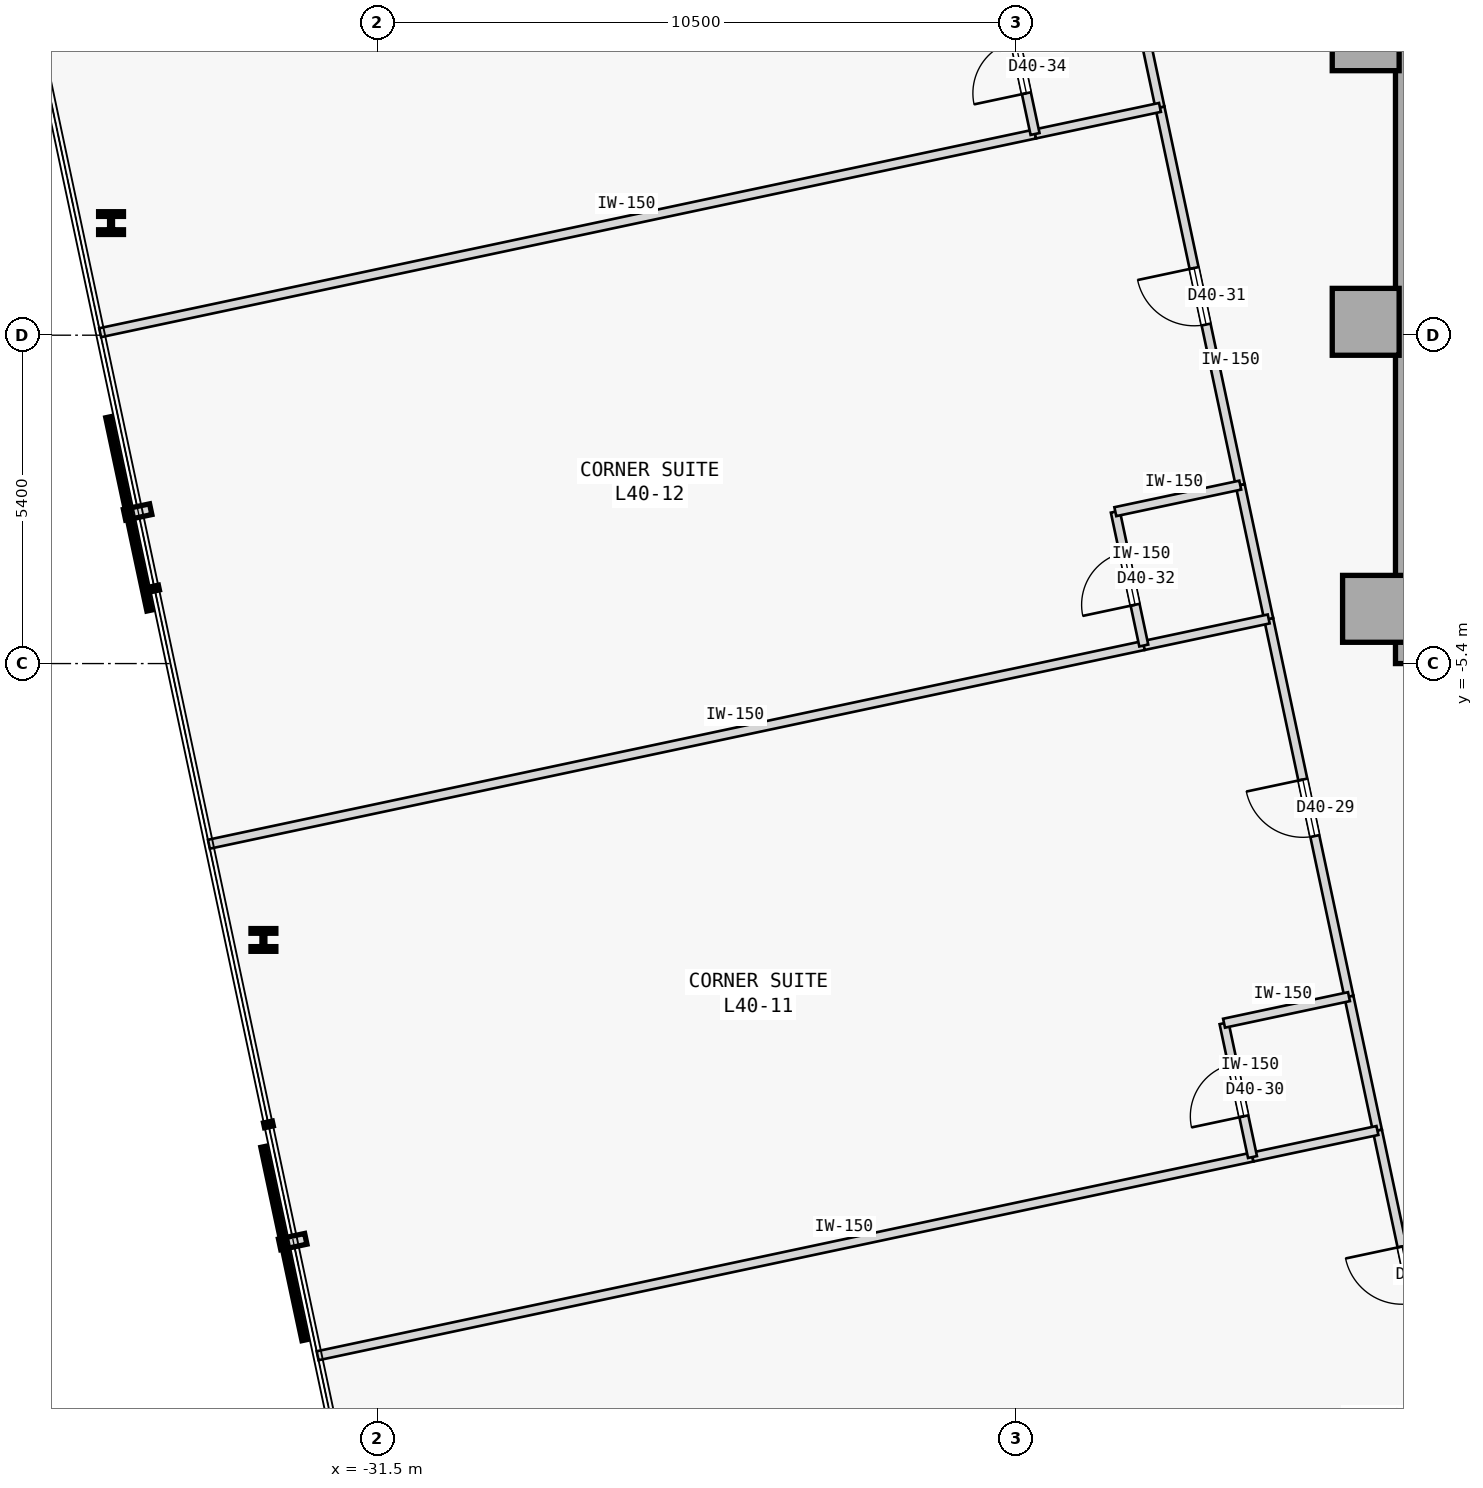
"""IFC4 building model, lengths in metres.
Left out: names, types, materials, properties, quantities, classifications, styles, units other than length and angle.
Written with IfcOpenShell. Run it as: python <this file> out.ifc"""

import sys

from ifc_helpers import new_model, si_unit, direction, frame, frame_2d, origin, origin_2d, place, context, subcontext, project, spatial, rectangle, i_section, extrude, element, fill, save


model = new_model("IFC4")
c1 = context("Model", 3, precision=1e-05, world=origin(), true_north=direction((0.0, 1.0)))
c2 = subcontext(c1, "Body", "Model", "MODEL_VIEW")
j1 = project(units=[si_unit("LENGTHUNIT", "METRE"), si_unit("PLANEANGLEUNIT", "RADIAN")], contexts=[c1])
p1 = place(None, origin())
s1 = spatial("IfcSite", under=j1, at=p1, CompositionType="ELEMENT")
p2 = place(p1, origin())
s2 = spatial("IfcBuilding", under=s1, at=p2, CompositionType="ELEMENT")
p3 = place(p2, frame((0.0, 0.0, 158.2)))
s3 = spatial("IfcBuildingStorey", under=s2, at=p3, CompositionType="ELEMENT", Elevation=158.2)
for number, where, z_axis, x_axis in (
    (1, (-15.25, 4.9, 0.0), (0.0, 0.0, 1.0), (1.0, 0.0, 0.0)),
    (2, (-15.25, 0.22, 0.0), (0.0, 0.0, 1.0), (1.0, 0.0, 0.0)),
    (3, (-15.08, -4.5, 0.0), (0.0, 0.0, 1.0), (1.0, 0.0, 0.0)),
):
    element("IfcColumn", number, at=place(p3, frame(where, z_axis=z_axis, x_axis=x_axis)), inside=s3, PredefinedType="COLUMN", context=c2, shape_type="SweptSolid", body=[
        extrude(rectangle(XDim=1.1, YDim=1.1, at=origin_2d()), origin(), (0.0, 0.0, 1.0), 3.4),
    ])
p4 = place(p3, frame((-14.56, -5.4, 0.0), z_axis=(0.0, 0.0, 1.0), x_axis=(0.0, 1.0, 0.0)))
e4 = element("IfcWall", 4, at=p4, inside=s3, PredefinedType="SHEAR", context=c2, shape_type="SweptSolid", body=[
    extrude(rectangle(XDim=10.8, YDim=0.4, at=frame_2d((5.4, 0.0))), origin(), (0.0, 0.0, 1.0), 3.175),
])
for number, where, z_axis, x_axis in (
    (5, (-35.883, 1.844, 0.0), (0.0, 0.0, 1.0), (1.0, 0.0, 0.0)),
    (6, (-33.377, -9.945, 0.0), (0.0, 0.0, 1.0), (1.0, 0.0, 0.0)),
):
    element("IfcColumn", number, at=place(p3, frame(where, z_axis=z_axis, x_axis=x_axis)), inside=s3, PredefinedType="COLUMN", context=c2, shape_type="SweptSolid", body=[
        extrude(i_section(OverallWidth=0.409, OverallDepth=0.374, WebThickness=0.048, FlangeThickness=0.077, FilletRadius=0.015, at=origin_2d()), origin(), (0.0, 0.0, 1.0), 3.4),
    ])
p5 = place(p3, frame((-14.049, -17.823, 0.0), z_axis=(0.0, 0.0, 1.0), x_axis=(-0.2079027059, 0.978149510494, 0.0)))
e7 = element("IfcWall", 7, at=p5, inside=s3, PredefinedType="PARTITIONING", context=c2, shape_type="SweptSolid", body=[
    extrude(rectangle(XDim=4.85, YDim=0.15, at=frame_2d((2.425, 0.0))), origin(), (0.0, 0.0, 1.0), 3.175),
])
p6 = place(p5, frame((1.95, 0.0, 0.0)))
e8 = element("IfcOpeningElement", 8, at=p6, cuts=e7, PredefinedType="OPENING", context=c2, shape_type="SweptSolid", body=[
    extrude(rectangle(XDim=0.95, YDim=2.15, at=frame_2d((0.475, 1.075))), frame((0.0, 0.085, 0.0), z_axis=(0.0, -1.0, 0.0), x_axis=(1.0, 0.0, 0.0)), (0.0, 0.0, 1.0), 0.17),
])
p7 = place(p3, frame((-15.525, -10.878, 0.0), z_axis=(0.0, 0.0, 1.0), x_axis=(-0.207887725283, 0.978152694459, 0.0)))
e9 = element("IfcWall", 9, at=p7, inside=s3, PredefinedType="PARTITIONING", context=c2, shape_type="SweptSolid", body=[
    extrude(rectangle(XDim=6.35, YDim=0.15, at=frame_2d((3.175, 0.0))), origin(), (0.0, 0.0, 1.0), 3.175),
])
p8 = place(p7, frame((2.7, 0.0, 0.0)))
e10 = element("IfcOpeningElement", 10, at=p8, cuts=e9, PredefinedType="OPENING", context=c2, shape_type="SweptSolid", body=[
    extrude(rectangle(XDim=0.95, YDim=2.15, at=frame_2d((0.475, 1.075))), frame((0.0, 0.085, 0.0), z_axis=(0.0, -1.0, 0.0), x_axis=(1.0, 0.0, 0.0)), (0.0, 0.0, 1.0), 0.17),
])
p9 = place(p3, frame((-15.057, -13.079, 0.0), z_axis=(0.0, 0.0, 1.0), x_axis=(-0.207995007687, 0.978129887478, 0.0)))
e11 = element("IfcWall", 11, at=p9, inside=s3, PredefinedType="PARTITIONING", context=c2, shape_type="SweptSolid", body=[
    extrude(rectangle(XDim=2.25, YDim=0.15, at=frame_2d((1.125, 0.0))), origin(), (0.0, 0.0, 1.0), 3.175),
])
p10 = place(p3, frame((-17.313, -2.466, 0.0), z_axis=(0.0, 0.0, 1.0), x_axis=(-0.207916691923, 0.978146537703, 0.0)))
e12 = element("IfcWall", 12, at=p10, inside=s3, PredefinedType="PARTITIONING", context=c2, shape_type="SweptSolid", body=[
    extrude(rectangle(XDim=6.35, YDim=0.15, at=frame_2d((3.175, 0.0))), origin(), (0.0, 0.0, 1.0), 3.175),
])
p11 = place(p10, frame((2.7, 0.0, 0.0)))
e13 = element("IfcOpeningElement", 13, at=p11, cuts=e12, PredefinedType="OPENING", context=c2, shape_type="SweptSolid", body=[
    extrude(rectangle(XDim=0.95, YDim=2.15, at=frame_2d((0.475, 1.075))), frame((0.0, 0.085, 0.0), z_axis=(0.0, -1.0, 0.0), x_axis=(1.0, 0.0, 0.0)), (0.0, 0.0, 1.0), 0.17),
])
for number, where, z_axis, x_axis in (
    (14, (-16.845, -4.667, 0.0), (0.0, 0.0, 1.0), (-0.208, 0.978, 0.0)),
    (15, (-18.633, 3.746, 0.0), (0.0, 0.0, 1.0), (-0.208, 0.978, 0.0)),
):
    element("IfcWall", number, at=place(p3, frame(where, z_axis=z_axis, x_axis=x_axis)), inside=s3, PredefinedType="PARTITIONING", context=c2, shape_type="SweptSolid", body=[
        extrude(rectangle(XDim=2.25, YDim=0.15, at=frame_2d((1.125, 0.0))), origin(), (0.0, 0.0, 1.0), 3.175),
    ])
p12 = place(p3, frame((-32.486, -16.783, 0.0), z_axis=(0.0, 0.0, 1.0), x_axis=(0.978146137903, 0.207918572776, 0.0)))
e16 = element("IfcWall", 16, at=p12, inside=s3, PredefinedType="PARTITIONING", context=c2, shape_type="SweptSolid", body=[
    extrude(rectangle(XDim=15.718, YDim=0.15, at=frame_2d((7.859, 0.0))), origin(), (0.0, 0.0, 1.0), 3.175),
])
p13 = place(p3, frame((-17.111, -13.515, 0.0), z_axis=(0.0, 0.0, 1.0), x_axis=(0.97815826, 0.207861536591, 0.0)))
e17 = element("IfcWall", 17, at=p13, inside=s3, PredefinedType="PARTITIONING", context=c2, shape_type="SweptSolid", body=[
    extrude(rectangle(XDim=2.1, YDim=0.15, at=frame_2d((1.05, 0.0))), origin(), (0.0, 0.0, 1.0), 3.175),
])
p14 = place(p3, frame((-17.111, -13.515, 0.0), z_axis=(0.0, 0.0, 1.0), x_axis=(-0.207913264065, 0.978147266328, 0.0)))
e18 = element("IfcWall", 18, at=p14, inside=s3, PredefinedType="PARTITIONING", context=c2, shape_type="SweptSolid", body=[
    extrude(rectangle(XDim=2.25, YDim=0.15, at=frame_2d((1.125, 0.0))), origin(), (0.0, 0.0, 1.0), 3.175),
])
p15 = place(p14, frame((0.685, 0.0, 0.0)))
e19 = element("IfcOpeningElement", 19, at=p15, cuts=e18, PredefinedType="OPENING", context=c2, shape_type="SweptSolid", body=[
    extrude(rectangle(XDim=0.88, YDim=2.15, at=frame_2d((0.44, 1.075))), frame((0.0, 0.085, 0.0), z_axis=(0.0, -1.0, 0.0), x_axis=(1.0, 0.0, 0.0)), (0.0, 0.0, 1.0), 0.17),
])
p16 = place(p3, frame((-17.579, -11.314, 0.0), z_axis=(0.0, 0.0, 1.0), x_axis=(0.978129588365, 0.207996414309, 0.0)))
e20 = element("IfcWall", 20, at=p16, inside=s3, PredefinedType="PARTITIONING", context=c2, shape_type="SweptSolid", body=[
    extrude(rectangle(XDim=2.1, YDim=0.15, at=frame_2d((1.05, 0.0))), origin(), (0.0, 0.0, 1.0), 3.175),
])
p17 = place(p3, frame((-34.274, -8.371, 0.0), z_axis=(0.0, 0.0, 1.0), x_axis=(0.978146137903, 0.207918572776, 0.0)))
e21 = element("IfcWall", 21, at=p17, inside=s3, PredefinedType="PARTITIONING", context=c2, shape_type="SweptSolid", body=[
    extrude(rectangle(XDim=15.718, YDim=0.15, at=frame_2d((7.859, 0.0))), origin(), (0.0, 0.0, 1.0), 3.175),
])
p18 = place(p3, frame((-18.899, -5.103, 0.0), z_axis=(0.0, 0.0, 1.0), x_axis=(0.97815826, 0.207861536591, 0.0)))
e22 = element("IfcWall", 22, at=p18, inside=s3, PredefinedType="PARTITIONING", context=c2, shape_type="SweptSolid", body=[
    extrude(rectangle(XDim=2.1, YDim=0.15, at=frame_2d((1.05, 0.0))), origin(), (0.0, 0.0, 1.0), 3.175),
])
p19 = place(p3, frame((-18.899, -5.103, 0.0), z_axis=(0.0, 0.0, 1.0), x_axis=(-0.207913264065, 0.978147266328, 0.0)))
e23 = element("IfcWall", 23, at=p19, inside=s3, PredefinedType="PARTITIONING", context=c2, shape_type="SweptSolid", body=[
    extrude(rectangle(XDim=2.25, YDim=0.15, at=frame_2d((1.125, 0.0))), origin(), (0.0, 0.0, 1.0), 3.175),
])
p20 = place(p19, frame((0.685, 0.0, 0.0)))
e24 = element("IfcOpeningElement", 24, at=p20, cuts=e23, PredefinedType="OPENING", context=c2, shape_type="SweptSolid", body=[
    extrude(rectangle(XDim=0.88, YDim=2.15, at=frame_2d((0.44, 1.075))), frame((0.0, 0.085, 0.0), z_axis=(0.0, -1.0, 0.0), x_axis=(1.0, 0.0, 0.0)), (0.0, 0.0, 1.0), 0.17),
])
p21 = place(p3, frame((-19.367, -2.902, 0.0), z_axis=(0.0, 0.0, 1.0), x_axis=(0.97815826, 0.207861536591, 0.0)))
e25 = element("IfcWall", 25, at=p21, inside=s3, PredefinedType="PARTITIONING", context=c2, shape_type="SweptSolid", body=[
    extrude(rectangle(XDim=2.1, YDim=0.15, at=frame_2d((1.05, 0.0))), origin(), (0.0, 0.0, 1.0), 3.175),
])
p22 = place(p3, frame((-36.062, 0.041, 0.0), z_axis=(0.0, 0.0, 1.0), x_axis=(0.978149296727, 0.207903711638, 0.0)))
e26 = element("IfcWall", 26, at=p22, inside=s3, PredefinedType="PARTITIONING", context=c2, shape_type="SweptSolid", body=[
    extrude(rectangle(XDim=15.718, YDim=0.15, at=frame_2d((7.859, 0.0))), origin(), (0.0, 0.0, 1.0), 3.175),
])
p23 = place(p3, frame((-20.688, 3.309, 0.0), z_axis=(0.0, 0.0, 1.0), x_axis=(0.978134617382, 0.207972763311, 0.0)))
e27 = element("IfcWall", 27, at=p23, inside=s3, PredefinedType="PARTITIONING", context=c2, shape_type="SweptSolid", body=[
    extrude(rectangle(XDim=2.1, YDim=0.15, at=frame_2d((1.05, 0.0))), origin(), (0.0, 0.0, 1.0), 3.175),
])
p24 = place(p3, frame((-20.688, 3.309, 0.0), z_axis=(0.0, 0.0, 1.0), x_axis=(-0.207891197838, 0.978151956427, 0.0)))
e28 = element("IfcWall", 28, at=p24, inside=s3, PredefinedType="PARTITIONING", context=c2, shape_type="SweptSolid", body=[
    extrude(rectangle(XDim=2.25, YDim=0.15, at=frame_2d((1.125, 0.0))), origin(), (0.0, 0.0, 1.0), 3.175),
])
p25 = place(p24, frame((0.685, 0.0, 0.0)))
e29 = element("IfcOpeningElement", 29, at=p25, cuts=e28, PredefinedType="OPENING", context=c2, shape_type="SweptSolid", body=[
    extrude(rectangle(XDim=0.88, YDim=2.15, at=frame_2d((0.44, 1.075))), frame((0.0, 0.085, 0.0), z_axis=(0.0, -1.0, 0.0), x_axis=(1.0, 0.0, 0.0)), (0.0, 0.0, 1.0), 0.17),
])
p26 = place(p6, origin())
e30 = element("IfcDoor", 30, at=p26, inside=s3, OperationType="SINGLE_SWING_RIGHT", PredefinedType="DOOR", context=c2, shape_type="SweptSolid", body=[
    extrude(rectangle(XDim=0.95, YDim=2.15, at=frame_2d((0.475, 1.075))), frame((0.0, 0.025, 0.0), z_axis=(0.0, -1.0, 0.0), x_axis=(1.0, 0.0, 0.0)), (0.0, 0.0, 1.0), 0.05),
])
fill(e8, e30)
p27 = place(p8, origin())
e31 = element("IfcDoor", 31, at=p27, inside=s3, OperationType="SINGLE_SWING_RIGHT", PredefinedType="DOOR", context=c2, shape_type="SweptSolid", body=[
    extrude(rectangle(XDim=0.95, YDim=2.15, at=frame_2d((0.475, 1.075))), frame((0.0, 0.025, 0.0), z_axis=(0.0, -1.0, 0.0), x_axis=(1.0, 0.0, 0.0)), (0.0, 0.0, 1.0), 0.05),
])
fill(e10, e31)
p28 = place(p15, origin())
e32 = element("IfcDoor", 32, at=p28, inside=s3, OperationType="SINGLE_SWING_LEFT", PredefinedType="DOOR", context=c2, shape_type="SweptSolid", body=[
    extrude(rectangle(XDim=0.88, YDim=2.15, at=frame_2d((0.44, 1.075))), frame((0.0, 0.025, 0.0), z_axis=(0.0, -1.0, 0.0), x_axis=(1.0, 0.0, 0.0)), (0.0, 0.0, 1.0), 0.05),
])
fill(e19, e32)
p29 = place(p11, origin())
e33 = element("IfcDoor", 33, at=p29, inside=s3, OperationType="SINGLE_SWING_RIGHT", PredefinedType="DOOR", context=c2, shape_type="SweptSolid", body=[
    extrude(rectangle(XDim=0.95, YDim=2.15, at=frame_2d((0.475, 1.075))), frame((0.0, 0.025, 0.0), z_axis=(0.0, -1.0, 0.0), x_axis=(1.0, 0.0, 0.0)), (0.0, 0.0, 1.0), 0.05),
])
fill(e13, e33)
p30 = place(p20, origin())
e34 = element("IfcDoor", 34, at=p30, inside=s3, OperationType="SINGLE_SWING_LEFT", PredefinedType="DOOR", context=c2, shape_type="SweptSolid", body=[
    extrude(rectangle(XDim=0.88, YDim=2.15, at=frame_2d((0.44, 1.075))), frame((0.0, 0.025, 0.0), z_axis=(0.0, -1.0, 0.0), x_axis=(1.0, 0.0, 0.0)), (0.0, 0.0, 1.0), 0.05),
])
fill(e24, e34)
p31 = place(p25, origin())
e35 = element("IfcDoor", 35, at=p31, inside=s3, OperationType="SINGLE_SWING_LEFT", PredefinedType="DOOR", context=c2, shape_type="SweptSolid", body=[
    extrude(rectangle(XDim=0.88, YDim=2.15, at=frame_2d((0.44, 1.075))), frame((0.0, 0.025, 0.0), z_axis=(0.0, -1.0, 0.0), x_axis=(1.0, 0.0, 0.0)), (0.0, 0.0, 1.0), 0.05),
])
fill(e29, e35)
save(model, sys.argv[1])
